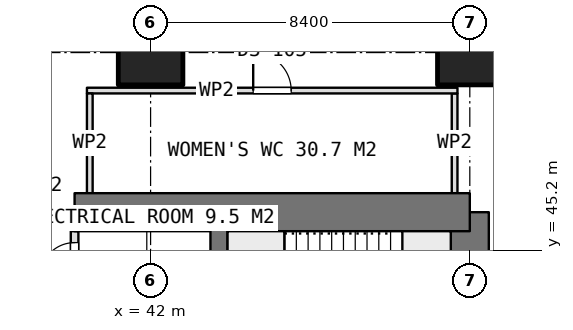
"""IFC4 building model, lengths in metres.
Left out: names, types, materials, properties, quantities, classifications, styles, units other than length and angle.
Written with IfcOpenShell. Run it as: python <this file> out.ifc"""

import sys

from ifc_helpers import new_model, si_unit, direction, frame, frame_2d, origin, origin_2d, place, context, subcontext, project, spatial, rectangle, extrude, element, fill, save


model = new_model("IFC4")
c1 = context("Model", 3, precision=1e-05, world=origin(), true_north=direction((0.0, 1.0)))
c2 = subcontext(c1, "Body", "Model", "MODEL_VIEW")
j1 = project(units=[si_unit("LENGTHUNIT", "METRE"), si_unit("PLANEANGLEUNIT", "RADIAN")], contexts=[c1])
p1 = place(None, origin())
s1 = spatial("IfcSite", under=j1, at=p1, CompositionType="ELEMENT")
p2 = place(p1, origin())
s2 = spatial("IfcBuilding", under=s1, at=p2, CompositionType="ELEMENT")
p3 = place(p2, frame((0.0, 0.0, 99.05)))
s3 = spatial("IfcBuildingStorey", under=s2, at=p3, CompositionType="ELEMENT", Elevation=99.05)
p4 = place(p3, frame((40.0, 46.2, 0.0), z_axis=(0.0, 0.0, 1.0), x_axis=(1.0, 0.0, 0.0)))
e1 = element("IfcWall", 1, at=p4, inside=s3, PredefinedType="SHEAR", context=c2, shape_type="SweptSolid", body=[
    extrude(rectangle(XDim=10.4, YDim=1.0, at=frame_2d((5.2, 0.0))), origin(), (0.0, 0.0, 1.0), 3.75),
])
p5 = place(p3, frame((50.4, 21.0, 0.0), z_axis=(0.0, 0.0, 1.0), x_axis=(0.0, 1.0, 0.0)))
e2 = element("IfcWall", 2, at=p5, inside=s3, PredefinedType="SHEAR", context=c2, shape_type="SweptSolid", body=[
    extrude(rectangle(XDim=25.2, YDim=1.0, at=frame_2d((12.6, 0.0))), origin(), (0.0, 0.0, 1.0), 3.75),
])
p6 = place(p5, frame((16.2, 0.0, 0.0)))
e3 = element("IfcOpeningElement", 3, at=p6, cuts=e2, PredefinedType="OPENING", context=c2, shape_type="SweptSolid", body=[
    extrude(rectangle(XDim=1.2, YDim=2.1, at=frame_2d((0.6, 1.05))), frame((0.0, 0.51, 0.0), z_axis=(0.0, -1.0, 0.0), x_axis=(1.0, 0.0, 0.0)), (0.0, 0.0, 1.0), 1.02),
])
p7 = place(p5, frame((10.05, 0.0, 0.0)))
e4 = element("IfcOpeningElement", 4, at=p7, cuts=e2, PredefinedType="OPENING", context=c2, shape_type="SweptSolid", body=[
    extrude(rectangle(XDim=0.9, YDim=2.1, at=frame_2d((0.45, 1.05))), frame((0.0, 0.51, 0.0), z_axis=(0.0, -1.0, 0.0), x_axis=(1.0, 0.0, 0.0)), (0.0, 0.0, 1.0), 1.02),
])
p8 = place(p5, frame((7.45, 0.0, 0.0)))
e5 = element("IfcOpeningElement", 5, at=p8, cuts=e2, PredefinedType="OPENING", context=c2, shape_type="SweptSolid", body=[
    extrude(rectangle(XDim=0.9, YDim=2.1, at=frame_2d((0.45, 1.05))), frame((0.0, 0.51, 0.0), z_axis=(0.0, -1.0, 0.0), x_axis=(1.0, 0.0, 0.0)), (0.0, 0.0, 1.0), 1.02),
])
p9 = place(p5, frame((0.7, 0.0, 0.0)))
e6 = element("IfcOpeningElement", 6, at=p9, cuts=e2, PredefinedType="OPENING", context=c2, shape_type="SweptSolid", body=[
    extrude(rectangle(XDim=1.2, YDim=2.1, at=frame_2d((0.6, 1.05))), frame((0.0, 0.51, 0.0), z_axis=(0.0, -1.0, 0.0), x_axis=(1.0, 0.0, 0.0)), (0.0, 0.0, 1.0), 1.02),
])
p10 = place(p3, frame((43.8, 21.0, 0.0), z_axis=(0.0, 0.0, 1.0), x_axis=(0.0, 1.0, 0.0)))
e7 = element("IfcWall", 7, at=p10, inside=s3, PredefinedType="SHEAR", context=c2, shape_type="SweptSolid", body=[
    extrude(rectangle(XDim=25.2, YDim=0.45, at=frame_2d((12.6, 0.0))), origin(), (0.0, 0.0, 1.0), 3.75),
])
for number, where, z_axis, x_axis in (
    (8, (42.0, 50.4, 0.0), (0.0, 0.0, 1.0), (1.0, 0.0, 0.0)),
    (9, (50.4, 50.4, 0.0), (0.0, 0.0, 1.0), (1.0, 0.0, 0.0)),
):
    element("IfcColumn", number, at=place(p3, frame(where, z_axis=z_axis, x_axis=x_axis)), inside=s3, PredefinedType="COLUMN", context=c2, shape_type="SweptSolid", body=[
        extrude(rectangle(XDim=1.7, YDim=1.7, at=origin_2d()), origin(), (0.0, 0.0, 1.0), 3.75),
    ])
p11 = place(p3, frame((40.0, 41.625, 0.0), z_axis=(0.0, 0.0, 1.0), x_axis=(0.0, 1.0, 0.0)))
e10 = element("IfcWall", 10, at=p11, inside=s3, PredefinedType="PARTITIONING", context=c2, shape_type="SweptSolid", body=[
    extrude(rectangle(XDim=4.075, YDim=0.2, at=frame_2d((2.038, 0.0))), origin(), (0.0, 0.0, 1.0), 3.5),
])
p12 = place(p11, frame((2.875, 0.0, 0.0)))
e11 = element("IfcOpeningElement", 11, at=p12, cuts=e10, PredefinedType="OPENING", context=c2, shape_type="SweptSolid", body=[
    extrude(rectangle(XDim=0.9, YDim=2.1, at=frame_2d((0.45, 1.05))), frame((0.0, 0.11, 0.0), z_axis=(0.0, -1.0, 0.0), x_axis=(1.0, 0.0, 0.0)), (0.0, 0.0, 1.0), 0.22),
])
p13 = place(p11, frame((0.475, 0.0, 0.0)))
e12 = element("IfcOpeningElement", 12, at=p13, cuts=e10, PredefinedType="OPENING", context=c2, shape_type="SweptSolid", body=[
    extrude(rectangle(XDim=0.9, YDim=2.1, at=frame_2d((0.45, 1.05))), frame((0.0, 0.11, 0.0), z_axis=(0.0, -1.0, 0.0), x_axis=(1.0, 0.0, 0.0)), (0.0, 0.0, 1.0), 0.22),
])
p14 = place(p3, frame((40.325, 49.4, 0.0), z_axis=(0.0, 0.0, 1.0), x_axis=(1.0, 0.0, 0.0)))
e13 = element("IfcWall", 13, at=p14, inside=s3, PredefinedType="PARTITIONING", context=c2, shape_type="SweptSolid", body=[
    extrude(rectangle(XDim=9.75, YDim=0.15, at=frame_2d((4.875, 0.0))), origin(), (0.0, 0.0, 1.0), 3.5),
])
p15 = place(p14, frame((4.375, 0.0, 0.0)))
e14 = element("IfcOpeningElement", 14, at=p15, cuts=e13, PredefinedType="OPENING", context=c2, shape_type="SweptSolid", body=[
    extrude(rectangle(XDim=1.0, YDim=2.1, at=frame_2d((0.5, 1.05))), frame((0.0, 0.085, 0.0), z_axis=(0.0, -1.0, 0.0), x_axis=(1.0, 0.0, 0.0)), (0.0, 0.0, 1.0), 0.17),
])
for number, where, z_axis, x_axis in (
    (15, (40.4, 46.7, 0.0), (0.0, 0.0, 1.0), (0.0, 1.0, 0.0)),
    (16, (50.0, 46.7, 0.0), (0.0, 0.0, 1.0), (0.0, 1.0, 0.0)),
):
    element("IfcWall", number, at=place(p3, frame(where, z_axis=z_axis, x_axis=x_axis)), inside=s3, PredefinedType="PARTITIONING", context=c2, shape_type="SweptSolid", body=[
        extrude(rectangle(XDim=2.625, YDim=0.15, at=frame_2d((1.312, 0.0))), origin(), (0.0, 0.0, 1.0), 3.5),
    ])
p16 = place(p12, origin())
e17 = element("IfcDoor", 17, at=p16, inside=s3, OperationType="SINGLE_SWING_LEFT", PredefinedType="DOOR", context=c2, shape_type="SweptSolid", body=[
    extrude(rectangle(XDim=0.9, YDim=2.1, at=frame_2d((0.45, 1.05))), frame((0.0, 0.025, 0.0), z_axis=(0.0, -1.0, 0.0), x_axis=(1.0, 0.0, 0.0)), (0.0, 0.0, 1.0), 0.05),
])
fill(e11, e17)
p17 = place(p15, origin())
e18 = element("IfcDoor", 18, at=p17, inside=s3, OperationType="SINGLE_SWING_LEFT", PredefinedType="DOOR", context=c2, shape_type="SweptSolid", body=[
    extrude(rectangle(XDim=1.0, YDim=2.1, at=frame_2d((0.5, 1.05))), frame((0.0, 0.025, 0.0), z_axis=(0.0, -1.0, 0.0), x_axis=(1.0, 0.0, 0.0)), (0.0, 0.0, 1.0), 0.05),
])
fill(e14, e18)
save(model, sys.argv[1])
